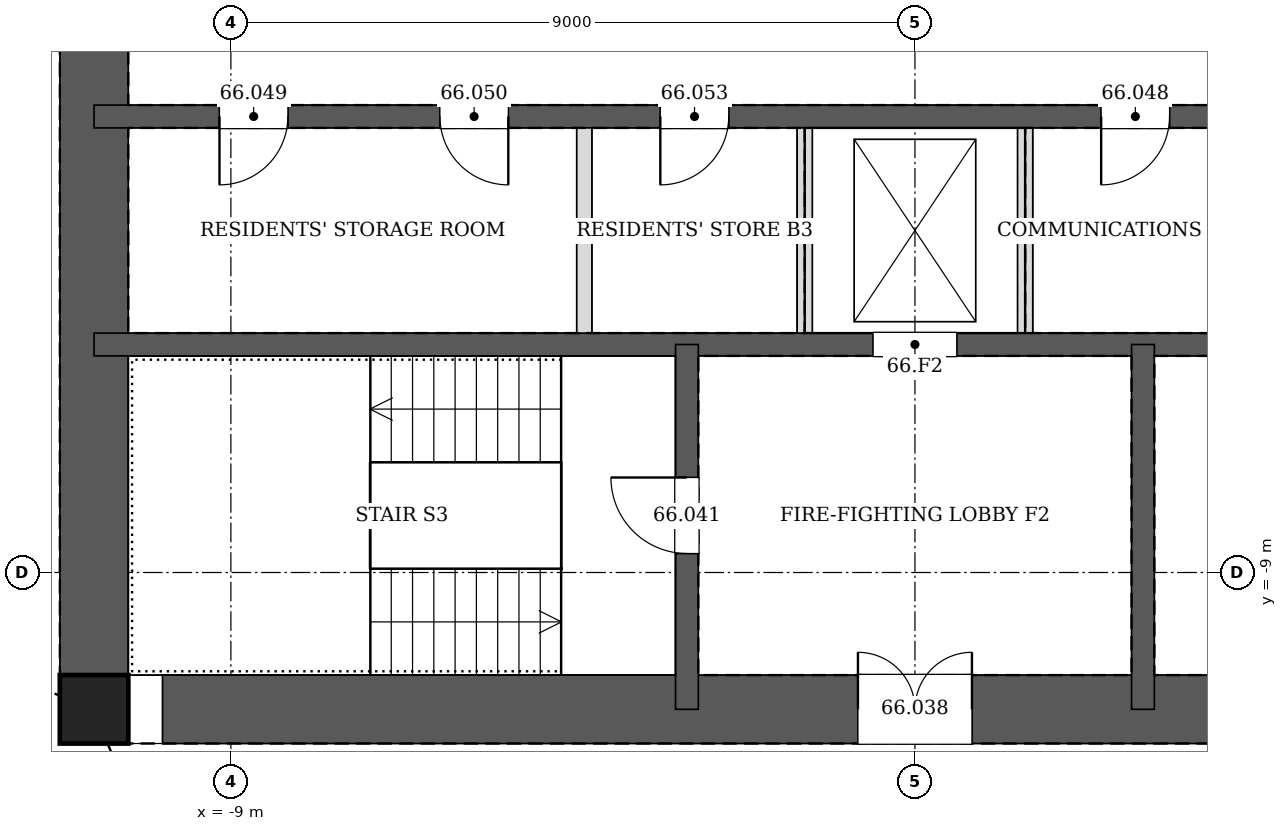
"""IFC4 building model, lengths in metres.
Left out: names, types, materials, properties, quantities, classifications, styles, units other than length and angle.
Written with IfcOpenShell. Run it as: python <this file> out.ifc"""

import sys

from ifc_helpers import new_model, si_unit, direction, frame, frame_2d, origin, origin_2d, place, context, subcontext, project, spatial, rectangle, hollow_rectangle, extrude, element, fill, save


model = new_model("IFC4")
c1 = context("Model", 3, precision=1e-05, world=origin(), true_north=direction((0.0, 1.0)))
c2 = subcontext(c1, "Body", "Model", "MODEL_VIEW")
j1 = project(units=[si_unit("LENGTHUNIT", "METRE"), si_unit("PLANEANGLEUNIT", "RADIAN")], contexts=[c1])
p1 = place(None, origin())
s1 = spatial("IfcSite", under=j1, at=p1, CompositionType="ELEMENT")
p2 = place(p1, origin())
s2 = spatial("IfcBuilding", under=s1, at=p2, CompositionType="ELEMENT")
p3 = place(p2, frame((0.0, 0.0, 274.2)))
s3 = spatial("IfcBuildingStorey", under=s2, at=p3, CompositionType="ELEMENT", Elevation=274.2)
p4 = place(p3, frame((-10.8, -10.8, 0.0), z_axis=(0.0, 0.0, 1.0), x_axis=(1.0, 0.0, 0.0)))
e1 = element("IfcColumn", 1, at=p4, inside=s3, PredefinedType="COLUMN", context=c2, shape_type="SweptSolid", body=[
    extrude(hollow_rectangle(XDim=0.9, YDim=0.9, WallThickness=0.04, at=origin_2d()), origin(), (0.0, 0.0, 1.0), 3.4),
])
p5 = place(p3, frame((-10.8, -10.8, 0.0), z_axis=(0.0, 0.0, 1.0), x_axis=(1.0, 0.0, 0.0)))
e2 = element("IfcWall", 2, at=p5, inside=s3, PredefinedType="SOLIDWALL", context=c2, shape_type="SweptSolid", body=[
    extrude(rectangle(XDim=21.6, YDim=0.9, at=frame_2d((10.8, 0.0))), origin(), (0.0, 0.0, 1.0), 3.4),
])
p6 = place(p5, frame((10.05, 0.0, 0.0)))
e3 = element("IfcOpeningElement", 3, at=p6, cuts=e2, PredefinedType="OPENING", context=c2, shape_type="SweptSolid", body=[
    extrude(rectangle(XDim=1.5, YDim=2.1, at=frame_2d((0.75, 1.05))), frame((0.0, 0.46, 0.0), z_axis=(0.0, -1.0, 0.0), x_axis=(1.0, 0.0, 0.0)), (0.0, 0.0, 1.0), 0.92),
])
p7 = place(p5, frame((17.1, 0.0, 0.0)))
e4 = element("IfcOpeningElement", 4, at=p7, cuts=e2, PredefinedType="OPENING", context=c2, shape_type="SweptSolid", body=[
    extrude(rectangle(XDim=0.9, YDim=2.1, at=frame_2d((0.45, 1.05))), frame((0.0, 0.46, 0.0), z_axis=(0.0, -1.0, 0.0), x_axis=(1.0, 0.0, 0.0)), (0.0, 0.0, 1.0), 0.92),
])
p8 = place(p3, frame((-10.8, 10.8, 0.0), z_axis=(0.0, 0.0, 1.0), x_axis=(0.0, -1.0, 0.0)))
e5 = element("IfcWall", 5, at=p8, inside=s3, PredefinedType="SOLIDWALL", context=c2, shape_type="SweptSolid", body=[
    extrude(rectangle(XDim=21.6, YDim=0.9, at=frame_2d((10.8, 0.0))), origin(), (0.0, 0.0, 1.0), 3.4),
])
p9 = place(p8, frame((8.7, 0.0, 0.0)))
e6 = element("IfcOpeningElement", 6, at=p9, cuts=e5, PredefinedType="OPENING", context=c2, shape_type="SweptSolid", body=[
    extrude(rectangle(XDim=1.2, YDim=2.1, at=frame_2d((0.6, 1.05))), frame((0.0, 0.46, 0.0), z_axis=(0.0, -1.0, 0.0), x_axis=(1.0, 0.0, 0.0)), (0.0, 0.0, 1.0), 0.92),
])
p10 = place(p8, frame((11.7, 0.0, 0.0)))
e7 = element("IfcOpeningElement", 7, at=p10, cuts=e5, PredefinedType="OPENING", context=c2, shape_type="SweptSolid", body=[
    extrude(rectangle(XDim=1.2, YDim=2.1, at=frame_2d((0.6, 1.05))), frame((0.0, 0.46, 0.0), z_axis=(0.0, -1.0, 0.0), x_axis=(1.0, 0.0, 0.0)), (0.0, 0.0, 1.0), 0.92),
])
p11 = place(p3, frame((-10.8, -3.0, 0.0), z_axis=(0.0, 0.0, 1.0), x_axis=(1.0, 0.0, 0.0)))
e8 = element("IfcWall", 8, at=p11, inside=s3, PredefinedType="SOLIDWALL", context=c2, shape_type="SweptSolid", body=[
    extrude(rectangle(XDim=21.6, YDim=0.3, at=frame_2d((10.8, 0.0))), origin(), (0.0, 0.0, 1.0), 3.4),
])
p12 = place(p11, frame((13.25, 0.0, 0.0)))
e9 = element("IfcOpeningElement", 9, at=p12, cuts=e8, PredefinedType="OPENING", context=c2, shape_type="SweptSolid", body=[
    extrude(rectangle(XDim=0.9, YDim=2.1, at=frame_2d((0.45, 1.05))), frame((0.0, 0.16, 0.0), z_axis=(0.0, -1.0, 0.0), x_axis=(1.0, 0.0, 0.0)), (0.0, 0.0, 1.0), 0.32),
])
p13 = place(p11, frame((1.65, 0.0, 0.0)))
e10 = element("IfcOpeningElement", 10, at=p13, cuts=e8, PredefinedType="OPENING", context=c2, shape_type="SweptSolid", body=[
    extrude(rectangle(XDim=0.9, YDim=2.1, at=frame_2d((0.45, 1.05))), frame((0.0, 0.16, 0.0), z_axis=(0.0, -1.0, 0.0), x_axis=(1.0, 0.0, 0.0)), (0.0, 0.0, 1.0), 0.32),
])
p14 = place(p11, frame((4.55, 0.0, 0.0)))
e11 = element("IfcOpeningElement", 11, at=p14, cuts=e8, PredefinedType="OPENING", context=c2, shape_type="SweptSolid", body=[
    extrude(rectangle(XDim=0.9, YDim=2.1, at=frame_2d((0.45, 1.05))), frame((0.0, 0.16, 0.0), z_axis=(0.0, -1.0, 0.0), x_axis=(1.0, 0.0, 0.0)), (0.0, 0.0, 1.0), 0.32),
])
p15 = place(p11, frame((7.45, 0.0, 0.0)))
e12 = element("IfcOpeningElement", 12, at=p15, cuts=e8, PredefinedType="OPENING", context=c2, shape_type="SweptSolid", body=[
    extrude(rectangle(XDim=0.9, YDim=2.1, at=frame_2d((0.45, 1.05))), frame((0.0, 0.16, 0.0), z_axis=(0.0, -1.0, 0.0), x_axis=(1.0, 0.0, 0.0)), (0.0, 0.0, 1.0), 0.32),
])
p16 = place(p11, frame((16.05, 0.0, 0.0)))
e13 = element("IfcOpeningElement", 13, at=p16, cuts=e8, PredefinedType="OPENING", context=c2, shape_type="SweptSolid", body=[
    extrude(rectangle(XDim=1.1, YDim=2.1, at=frame_2d((0.55, 1.05))), frame((0.0, 0.16, 0.0), z_axis=(0.0, -1.0, 0.0), x_axis=(1.0, 0.0, 0.0)), (0.0, 0.0, 1.0), 0.32),
])
p17 = place(p11, frame((18.95, 0.0, 0.0)))
e14 = element("IfcOpeningElement", 14, at=p17, cuts=e8, PredefinedType="OPENING", context=c2, shape_type="SweptSolid", body=[
    extrude(rectangle(XDim=1.1, YDim=2.1, at=frame_2d((0.55, 1.05))), frame((0.0, 0.16, 0.0), z_axis=(0.0, -1.0, 0.0), x_axis=(1.0, 0.0, 0.0)), (0.0, 0.0, 1.0), 0.32),
])
p18 = place(p3, frame((-10.8, -6.0, 0.0), z_axis=(0.0, 0.0, 1.0), x_axis=(1.0, 0.0, 0.0)))
e15 = element("IfcWall", 15, at=p18, inside=s3, PredefinedType="SOLIDWALL", context=c2, shape_type="SweptSolid", body=[
    extrude(rectangle(XDim=21.6, YDim=0.3, at=frame_2d((10.8, 0.0))), origin(), (0.0, 0.0, 1.0), 3.4),
])
p19 = place(p18, frame((10.25, 0.0, 0.0)))
e16 = element("IfcOpeningElement", 16, at=p19, cuts=e15, PredefinedType="OPENING", context=c2, shape_type="SweptSolid", body=[
    extrude(rectangle(XDim=1.1, YDim=2.1, at=frame_2d((0.55, 1.05))), frame((0.0, 0.16, 0.0), z_axis=(0.0, -1.0, 0.0), x_axis=(1.0, 0.0, 0.0)), (0.0, 0.0, 1.0), 0.32),
])
p20 = place(p3, frame((-3.0, -6.0, 0.0), z_axis=(0.0, 0.0, 1.0), x_axis=(0.0, -1.0, 0.0)))
e17 = element("IfcWall", 17, at=p20, inside=s3, PredefinedType="SOLIDWALL", context=c2, shape_type="SweptSolid", body=[
    extrude(rectangle(XDim=4.8, YDim=0.3, at=frame_2d((2.4, 0.0))), origin(), (0.0, 0.0, 1.0), 3.4),
])
p21 = place(p20, frame((1.75, 0.0, 0.0)))
e18 = element("IfcOpeningElement", 18, at=p21, cuts=e17, PredefinedType="OPENING", context=c2, shape_type="SweptSolid", body=[
    extrude(rectangle(XDim=1.0, YDim=2.1, at=frame_2d((0.5, 1.05))), frame((0.0, 0.16, 0.0), z_axis=(0.0, -1.0, 0.0), x_axis=(1.0, 0.0, 0.0)), (0.0, 0.0, 1.0), 0.32),
])
p22 = place(p3, frame((3.0, -6.0, 0.0), z_axis=(0.0, 0.0, 1.0), x_axis=(0.0, -1.0, 0.0)))
e19 = element("IfcWall", 19, at=p22, inside=s3, PredefinedType="SOLIDWALL", context=c2, shape_type="SweptSolid", body=[
    extrude(rectangle(XDim=4.8, YDim=0.3, at=frame_2d((2.4, 0.0))), origin(), (0.0, 0.0, 1.0), 3.4),
])
for number, where, z_axis, x_axis in (
    (20, (-4.35, -5.85, 0.0), (0.0, 0.0, 1.0), (0.0, 1.0, 0.0)),
    (21, (-1.45, -5.85, 0.0), (0.0, 0.0, 1.0), (0.0, 1.0, 0.0)),
    (22, (1.45, -5.85, 0.0), (0.0, 0.0, 1.0), (0.0, 1.0, 0.0)),
):
    element("IfcWall", number, at=place(p3, frame(where, z_axis=z_axis, x_axis=x_axis)), inside=s3, PredefinedType="PARTITIONING", context=c2, shape_type="SweptSolid", body=[
        extrude(rectangle(XDim=2.7, YDim=0.2, at=frame_2d((1.35, 0.0))), origin(), (0.0, 0.0, 1.0), 3.2),
    ])
p23 = place(p6, origin())
e23 = element("IfcDoor", 23, at=p23, inside=s3, OperationType="DOUBLE_DOOR_SINGLE_SWING", PredefinedType="DOOR", context=c2, shape_type="SweptSolid", body=[
    extrude(rectangle(XDim=1.5, YDim=2.1, at=frame_2d((0.75, 1.05))), frame((0.0, 0.025, 0.0), z_axis=(0.0, -1.0, 0.0), x_axis=(1.0, 0.0, 0.0)), (0.0, 0.0, 1.0), 0.05),
])
fill(e3, e23)
p24 = place(p21, frame((1.0, 0.0, 0.0), z_axis=(0.0, 0.0, 1.0), x_axis=(-1.0, 0.0, 0.0)))
e24 = element("IfcDoor", 24, at=p24, inside=s3, OperationType="SINGLE_SWING_RIGHT", PredefinedType="DOOR", context=c2, shape_type="SweptSolid", body=[
    extrude(rectangle(XDim=1.0, YDim=2.1, at=frame_2d((0.5, 1.05))), frame((0.0, 0.025, 0.0), z_axis=(0.0, -1.0, 0.0), x_axis=(1.0, 0.0, 0.0)), (0.0, 0.0, 1.0), 0.05),
])
fill(e18, e24)
p25 = place(p12, frame((0.9, 0.0, 0.0), z_axis=(0.0, 0.0, 1.0), x_axis=(-1.0, 0.0, 0.0)))
e25 = element("IfcDoor", 25, at=p25, inside=s3, OperationType="SINGLE_SWING_RIGHT", PredefinedType="DOOR", context=c2, shape_type="SweptSolid", body=[
    extrude(rectangle(XDim=0.9, YDim=2.1, at=frame_2d((0.45, 1.05))), frame((0.0, 0.025, 0.0), z_axis=(0.0, -1.0, 0.0), x_axis=(1.0, 0.0, 0.0)), (0.0, 0.0, 1.0), 0.05),
])
fill(e9, e25)
p26 = place(p13, frame((0.9, 0.0, 0.0), z_axis=(0.0, 0.0, 1.0), x_axis=(-1.0, 0.0, 0.0)))
e26 = element("IfcDoor", 26, at=p26, inside=s3, OperationType="SINGLE_SWING_RIGHT", PredefinedType="DOOR", context=c2, shape_type="SweptSolid", body=[
    extrude(rectangle(XDim=0.9, YDim=2.1, at=frame_2d((0.45, 1.05))), frame((0.0, 0.025, 0.0), z_axis=(0.0, -1.0, 0.0), x_axis=(1.0, 0.0, 0.0)), (0.0, 0.0, 1.0), 0.05),
])
fill(e10, e26)
p27 = place(p14, frame((0.9, 0.0, 0.0), z_axis=(0.0, 0.0, 1.0), x_axis=(-1.0, 0.0, 0.0)))
e27 = element("IfcDoor", 27, at=p27, inside=s3, OperationType="SINGLE_SWING_LEFT", PredefinedType="DOOR", context=c2, shape_type="SweptSolid", body=[
    extrude(rectangle(XDim=0.9, YDim=2.1, at=frame_2d((0.45, 1.05))), frame((0.0, 0.025, 0.0), z_axis=(0.0, -1.0, 0.0), x_axis=(1.0, 0.0, 0.0)), (0.0, 0.0, 1.0), 0.05),
])
fill(e11, e27)
p28 = place(p15, frame((0.9, 0.0, 0.0), z_axis=(0.0, 0.0, 1.0), x_axis=(-1.0, 0.0, 0.0)))
e28 = element("IfcDoor", 28, at=p28, inside=s3, OperationType="SINGLE_SWING_RIGHT", PredefinedType="DOOR", context=c2, shape_type="SweptSolid", body=[
    extrude(rectangle(XDim=0.9, YDim=2.1, at=frame_2d((0.45, 1.05))), frame((0.0, 0.025, 0.0), z_axis=(0.0, -1.0, 0.0), x_axis=(1.0, 0.0, 0.0)), (0.0, 0.0, 1.0), 0.05),
])
fill(e12, e28)
p29 = place(p19, origin())
e29 = element("IfcDoor", 29, at=p29, inside=s3, OperationType="DOUBLE_DOOR_SLIDING", PredefinedType="DOOR", context=c2, shape_type="SweptSolid", body=[
    extrude(rectangle(XDim=1.1, YDim=2.1, at=frame_2d((0.55, 1.05))), frame((0.0, 0.025, 0.0), z_axis=(0.0, -1.0, 0.0), x_axis=(1.0, 0.0, 0.0)), (0.0, 0.0, 1.0), 0.05),
])
fill(e16, e29)
save(model, sys.argv[1])
